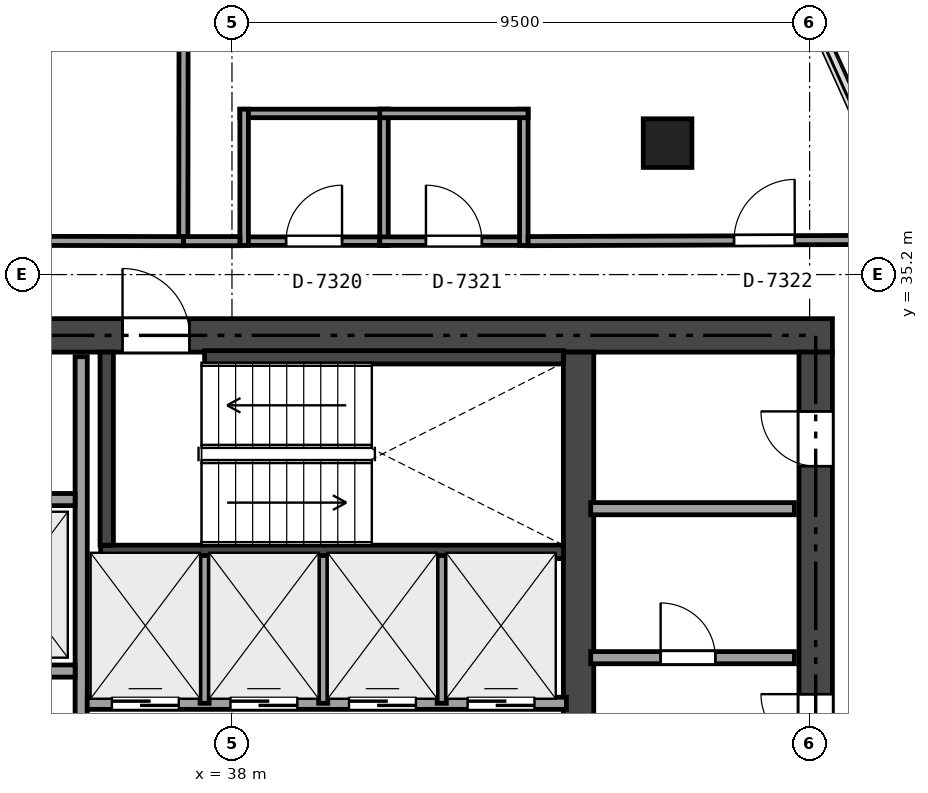
"""IFC4 building model, lengths in metres.
Left out: names, types, materials, properties, quantities, classifications, styles, units other than length and angle.
Written with IfcOpenShell. Run it as: python <this file> out.ifc"""

import sys

from ifc_helpers import new_model, si_unit, direction, frame, frame_2d, origin, origin_2d, place, context, subcontext, project, spatial, rectangle, extrude, element, fill, save


model = new_model("IFC4")
c1 = context("Model", 3, precision=1e-05, world=origin(), true_north=direction((0.0, 1.0)))
c2 = subcontext(c1, "Body", "Model", "MODEL_VIEW")
j1 = project(units=[si_unit("LENGTHUNIT", "METRE"), si_unit("PLANEANGLEUNIT", "RADIAN")], contexts=[c1])
p1 = place(None, origin())
s1 = spatial("IfcSite", under=j1, at=p1, CompositionType="ELEMENT")
p2 = place(p1, origin())
s2 = spatial("IfcBuilding", under=s1, at=p2, CompositionType="ELEMENT")
p3 = place(p2, frame((0.0, 0.0, 271.5)))
s3 = spatial("IfcBuildingStorey", under=s2, at=p3, CompositionType="ELEMENT", Elevation=271.5)
p4 = place(p3, frame((26.525, 34.2, 0.0), z_axis=(0.0, 0.0, 1.0), x_axis=(1.0, 0.0, 0.0)))
e1 = element("IfcWall", 1, at=p4, inside=s3, PredefinedType="SHEAR", context=c2, shape_type="SweptSolid", body=[
    extrude(rectangle(XDim=21.35, YDim=0.55, at=frame_2d((10.675, 0.0))), origin(), (0.0, 0.0, 1.0), 3.32),
])
p5 = place(p4, frame((9.675, 0.0, 0.0)))
e2 = element("IfcOpeningElement", 2, at=p5, cuts=e1, PredefinedType="OPENING", context=c2, shape_type="SweptSolid", body=[
    extrude(rectangle(XDim=1.1, YDim=2.15, at=frame_2d((0.55, 1.075))), frame((0.0, 0.285, 0.0), z_axis=(0.0, -1.0, 0.0), x_axis=(1.0, 0.0, 0.0)), (0.0, 0.0, 1.0), 0.57),
])
p6 = place(p4, frame((1.925, 0.0, 0.0)))
e3 = element("IfcOpeningElement", 3, at=p6, cuts=e1, PredefinedType="OPENING", context=c2, shape_type="SweptSolid", body=[
    extrude(rectangle(XDim=0.9, YDim=2.1, at=frame_2d((0.45, 1.05))), frame((0.0, 0.285, 0.0), z_axis=(0.0, -1.0, 0.0), x_axis=(1.0, 0.0, 0.0)), (0.0, 0.0, 1.0), 0.57),
])
p7 = place(p4, frame((6.225, 0.0, 0.0)))
e4 = element("IfcOpeningElement", 4, at=p7, cuts=e1, PredefinedType="OPENING", context=c2, shape_type="SweptSolid", body=[
    extrude(rectangle(XDim=0.9, YDim=2.1, at=frame_2d((0.45, 1.05))), frame((0.0, 0.285, 0.0), z_axis=(0.0, -1.0, 0.0), x_axis=(1.0, 0.0, 0.0)), (0.0, 0.0, 1.0), 0.57),
])
p8 = place(p3, frame((47.6, 18.875, 0.0), z_axis=(0.0, 0.0, 1.0), x_axis=(0.0, 1.0, 0.0)))
e5 = element("IfcWall", 5, at=p8, inside=s3, PredefinedType="SHEAR", context=c2, shape_type="SweptSolid", body=[
    extrude(rectangle(XDim=15.05, YDim=0.55, at=frame_2d((7.525, 0.0))), origin(), (0.0, 0.0, 1.0), 3.32),
])
p9 = place(p8, frame((6.625, 0.0, 0.0)))
e6 = element("IfcOpeningElement", 6, at=p9, cuts=e5, PredefinedType="OPENING", context=c2, shape_type="SweptSolid", body=[
    extrude(rectangle(XDim=1.1, YDim=2.15, at=frame_2d((0.55, 1.075))), frame((0.0, 0.285, 0.0), z_axis=(0.0, -1.0, 0.0), x_axis=(1.0, 0.0, 0.0)), (0.0, 0.0, 1.0), 0.57),
])
p10 = place(p8, frame((8.525, 0.0, 0.0)))
e7 = element("IfcOpeningElement", 7, at=p10, cuts=e5, PredefinedType="OPENING", context=c2, shape_type="SweptSolid", body=[
    extrude(rectangle(XDim=0.9, YDim=2.1, at=frame_2d((0.45, 1.05))), frame((0.0, 0.285, 0.0), z_axis=(0.0, -1.0, 0.0), x_axis=(1.0, 0.0, 0.0)), (0.0, 0.0, 1.0), 0.57),
])
p11 = place(p8, frame((13.175, 0.0, 0.0)))
e8 = element("IfcOpeningElement", 8, at=p11, cuts=e5, PredefinedType="OPENING", context=c2, shape_type="SweptSolid", body=[
    extrude(rectangle(XDim=0.9, YDim=2.1, at=frame_2d((0.45, 1.05))), frame((0.0, 0.285, 0.0), z_axis=(0.0, -1.0, 0.0), x_axis=(1.0, 0.0, 0.0)), (0.0, 0.0, 1.0), 0.57),
])
p12 = place(p3, frame((43.7, 18.875, 0.0), z_axis=(0.0, 0.0, 1.0), x_axis=(0.0, 1.0, 0.0)))
e9 = element("IfcWall", 9, at=p12, inside=s3, PredefinedType="SHEAR", context=c2, shape_type="SweptSolid", body=[
    extrude(rectangle(XDim=15.05, YDim=0.5, at=frame_2d((7.525, 0.0))), origin(), (0.0, 0.0, 1.0), 3.32),
])
p13 = place(p12, frame((8.125, 0.0, 0.0)))
e10 = element("IfcOpeningElement", 10, at=p13, cuts=e9, PredefinedType="OPENING", context=c2, shape_type="SweptSolid", body=[
    extrude(rectangle(XDim=0.9, YDim=2.1, at=frame_2d((0.45, 1.05))), frame((0.0, 0.26, 0.0), z_axis=(0.0, -1.0, 0.0), x_axis=(1.0, 0.0, 0.0)), (0.0, 0.0, 1.0), 0.52),
])
p14 = place(p3, frame((35.84, 30.64, 0.0), z_axis=(0.0, 0.0, 1.0), x_axis=(1.0, 0.0, 0.0)))
e11 = element("IfcWall", 11, at=p14, inside=s3, PredefinedType="SHEAR", context=c2, shape_type="SweptSolid", body=[
    extrude(rectangle(XDim=7.61, YDim=0.22, at=frame_2d((3.805, 0.0))), origin(), (0.0, 0.0, 1.0), 3.32),
])
p15 = place(p3, frame((35.94, 30.75, 0.0), z_axis=(0.0, 0.0, 1.0), x_axis=(0.0, 1.0, 0.0)))
e12 = element("IfcWall", 12, at=p15, inside=s3, PredefinedType="SHEAR", context=c2, shape_type="SweptSolid", body=[
    extrude(rectangle(XDim=3.175, YDim=0.22, at=frame_2d((1.587, 0.0))), origin(), (0.0, 0.0, 1.0), 3.32),
])
p16 = place(p3, frame((37.55, 33.84, 0.0), z_axis=(0.0, 0.0, 1.0), x_axis=(1.0, 0.0, 0.0)))
e13 = element("IfcWall", 13, at=p16, inside=s3, PredefinedType="SHEAR", context=c2, shape_type="SweptSolid", body=[
    extrude(rectangle(XDim=5.9, YDim=0.22, at=frame_2d((2.95, 0.0))), origin(), (0.0, 0.0, 1.0), 3.32),
])
p17 = place(p3, frame((45.164, 37.362, 0.0), z_axis=(0.0, 0.0, 1.0), x_axis=(1.0, 0.0, 0.0)))
e14 = element("IfcColumn", 14, at=p17, inside=s3, PredefinedType="COLUMN", context=c2, shape_type="SweptSolid", body=[
    extrude(rectangle(XDim=0.8, YDim=0.8, at=origin_2d()), origin(), (0.0, 0.0, 1.0), 3.32),
])
p18 = place(p3, frame((43.9, 28.9, 0.0), z_axis=(0.0, 0.0, 1.0), x_axis=(1.0, 0.0, 0.0)))
e15 = element("IfcWall", 15, at=p18, inside=s3, PredefinedType="SOLIDWALL", context=c2, shape_type="SweptSolid", body=[
    extrude(rectangle(XDim=3.35, YDim=0.2, at=frame_2d((1.675, 0.0))), origin(), (0.0, 0.0, 1.0), 3.32),
])
p19 = place(p18, frame((1.15, 0.0, 0.0)))
e16 = element("IfcOpeningElement", 16, at=p19, cuts=e15, PredefinedType="OPENING", context=c2, shape_type="SweptSolid", body=[
    extrude(rectangle(XDim=0.9, YDim=2.1, at=frame_2d((0.45, 1.05))), frame((0.0, 0.11, 0.0), z_axis=(0.0, -1.0, 0.0), x_axis=(1.0, 0.0, 0.0)), (0.0, 0.0, 1.0), 0.22),
])
p20 = place(p3, frame((43.9, 31.35, 0.0), z_axis=(0.0, 0.0, 1.0), x_axis=(1.0, 0.0, 0.0)))
e17 = element("IfcWall", 17, at=p20, inside=s3, PredefinedType="SOLIDWALL", context=c2, shape_type="SweptSolid", body=[
    extrude(rectangle(XDim=3.35, YDim=0.2, at=frame_2d((1.675, 0.0))), origin(), (0.0, 0.0, 1.0), 2.993),
])
p21 = place(p3, frame((35.52, 18.95, 0.0), z_axis=(0.0, 0.0, 1.0), x_axis=(0.0, 1.0, 0.0)))
e18 = element("IfcWall", 18, at=p21, inside=s3, PredefinedType="SOLIDWALL", context=c2, shape_type="SweptSolid", body=[
    extrude(rectangle(XDim=14.9, YDim=0.2, at=frame_2d((7.45, 0.0))), origin(), (0.0, 0.0, 1.0), 2.841),
])
p22 = place(p21, frame((7.755, 0.0, 0.0)))
e19 = element("IfcOpeningElement", 19, at=p22, cuts=e18, PredefinedType="OPENING", context=c2, shape_type="SweptSolid", body=[
    extrude(rectangle(XDim=0.95, YDim=2.15, at=frame_2d((0.475, 1.075))), frame((0.0, 0.11, 0.0), z_axis=(0.0, -1.0, 0.0), x_axis=(1.0, 0.0, 0.0)), (0.0, 0.0, 1.0), 0.22),
])
p23 = place(p21, frame((0.6, 0.0, 0.0)))
e20 = element("IfcOpeningElement", 20, at=p23, cuts=e18, PredefinedType="OPENING", context=c2, shape_type="SweptSolid", body=[
    extrude(rectangle(XDim=0.9, YDim=2.1, at=frame_2d((0.45, 1.05))), frame((0.0, 0.11, 0.0), z_axis=(0.0, -1.0, 0.0), x_axis=(1.0, 0.0, 0.0)), (0.0, 0.0, 1.0), 0.22),
])
p24 = place(p3, frame((31.0, 28.68, 0.0), z_axis=(0.0, 0.0, 1.0), x_axis=(1.0, 0.0, 0.0)))
e21 = element("IfcWall", 21, at=p24, inside=s3, PredefinedType="SOLIDWALL", context=c2, shape_type="SweptSolid", body=[
    extrude(rectangle(XDim=4.42, YDim=0.2, at=frame_2d((2.21, 0.0))), origin(), (0.0, 0.0, 1.0), 3.32),
])
p25 = place(p24, frame((0.6, 0.0, 0.0)))
e22 = element("IfcOpeningElement", 22, at=p25, cuts=e21, PredefinedType="OPENING", context=c2, shape_type="SweptSolid", body=[
    extrude(rectangle(XDim=1.1, YDim=2.15, at=frame_2d((0.55, 1.075))), frame((0.0, 0.11, 0.0), z_axis=(0.0, -1.0, 0.0), x_axis=(1.0, 0.0, 0.0)), (0.0, 0.0, 1.0), 0.22),
])
p26 = place(p24, frame((2.85, 0.0, 0.0)))
e23 = element("IfcOpeningElement", 23, at=p26, cuts=e21, PredefinedType="OPENING", context=c2, shape_type="SweptSolid", body=[
    extrude(rectangle(XDim=1.1, YDim=2.15, at=frame_2d((0.55, 1.075))), frame((0.0, 0.11, 0.0), z_axis=(0.0, -1.0, 0.0), x_axis=(1.0, 0.0, 0.0)), (0.0, 0.0, 1.0), 0.22),
])
p27 = place(p3, frame((31.0, 31.5, 0.0), z_axis=(0.0, 0.0, 1.0), x_axis=(1.0, 0.0, 0.0)))
e24 = element("IfcWall", 24, at=p27, inside=s3, PredefinedType="SOLIDWALL", context=c2, shape_type="SweptSolid", body=[
    extrude(rectangle(XDim=4.42, YDim=0.2, at=frame_2d((2.21, 0.0))), origin(), (0.0, 0.0, 1.0), 3.32),
])
p28 = place(p3, frame((35.62, 28.15, 0.0), z_axis=(0.0, 0.0, 1.0), x_axis=(1.0, 0.0, 0.0)))
e25 = element("IfcWall", 25, at=p28, inside=s3, PredefinedType="SOLIDWALL", context=c2, shape_type="SweptSolid", body=[
    extrude(rectangle(XDim=7.88, YDim=0.2, at=frame_2d((3.94, 0.0))), origin(), (0.0, 0.0, 1.0), 3.32),
])
p29 = place(p28, frame((0.405, 0.0, 0.0)))
e26 = element("IfcOpeningElement", 26, at=p29, cuts=e25, PredefinedType="OPENING", context=c2, shape_type="SweptSolid", body=[
    extrude(rectangle(XDim=1.1, YDim=2.15, at=frame_2d((0.55, 1.075))), frame((0.0, 0.11, 0.0), z_axis=(0.0, -1.0, 0.0), x_axis=(1.0, 0.0, 0.0)), (0.0, 0.0, 1.0), 0.22),
])
p30 = place(p28, frame((2.355, 0.0, 0.0)))
e27 = element("IfcOpeningElement", 27, at=p30, cuts=e25, PredefinedType="OPENING", context=c2, shape_type="SweptSolid", body=[
    extrude(rectangle(XDim=1.1, YDim=2.15, at=frame_2d((0.55, 1.075))), frame((0.0, 0.11, 0.0), z_axis=(0.0, -1.0, 0.0), x_axis=(1.0, 0.0, 0.0)), (0.0, 0.0, 1.0), 0.22),
])
p31 = place(p28, frame((4.305, 0.0, 0.0)))
e28 = element("IfcOpeningElement", 28, at=p31, cuts=e25, PredefinedType="OPENING", context=c2, shape_type="SweptSolid", body=[
    extrude(rectangle(XDim=1.1, YDim=2.15, at=frame_2d((0.55, 1.075))), frame((0.0, 0.11, 0.0), z_axis=(0.0, -1.0, 0.0), x_axis=(1.0, 0.0, 0.0)), (0.0, 0.0, 1.0), 0.22),
])
p32 = place(p28, frame((6.255, 0.0, 0.0)))
e29 = element("IfcOpeningElement", 29, at=p32, cuts=e25, PredefinedType="OPENING", context=c2, shape_type="SweptSolid", body=[
    extrude(rectangle(XDim=1.1, YDim=2.15, at=frame_2d((0.55, 1.075))), frame((0.0, 0.11, 0.0), z_axis=(0.0, -1.0, 0.0), x_axis=(1.0, 0.0, 0.0)), (0.0, 0.0, 1.0), 0.22),
])
for number, where, z_axis, x_axis in (
    (30, (37.55, 28.15, 0.0), (0.0, 0.0, 1.0), (0.0, 1.0, 0.0)),
    (31, (39.5, 28.15, 0.0), (0.0, 0.0, 1.0), (0.0, 1.0, 0.0)),
    (32, (41.45, 28.15, 0.0), (0.0, 0.0, 1.0), (0.0, 1.0, 0.0)),
):
    element("IfcWall", number, at=place(p3, frame(where, z_axis=z_axis, x_axis=x_axis)), inside=s3, PredefinedType="PARTITIONING", context=c2, shape_type="SweptSolid", body=[
        extrude(rectangle(XDim=2.43, YDim=0.15, at=frame_2d((1.215, 0.0))), origin(), (0.0, 0.0, 1.0), 3.32),
    ])
p33 = place(p3, frame((38.13, 35.75, 0.0), z_axis=(0.0, 0.0, 1.0), x_axis=(1.0, 0.0, 0.0)))
e33 = element("IfcWall", 33, at=p33, inside=s3, PredefinedType="PARTITIONING", context=c2, shape_type="SweptSolid", body=[
    extrude(rectangle(XDim=2.44, YDim=0.14, at=frame_2d((1.22, 0.0))), origin(), (0.0, 0.0, 1.0), 2.841),
])
p34 = place(p33, frame((0.76, 0.0, 0.0)))
e34 = element("IfcOpeningElement", 34, at=p34, cuts=e33, PredefinedType="OPENING", context=c2, shape_type="SweptSolid", body=[
    extrude(rectangle(XDim=0.92, YDim=2.1, at=frame_2d((0.46, 1.05))), frame((0.0, 0.08, 0.0), z_axis=(0.0, -1.0, 0.0), x_axis=(1.0, 0.0, 0.0)), (0.0, 0.0, 1.0), 0.16),
])
p35 = place(p3, frame((40.5, 35.68, 0.0), z_axis=(0.0, 0.0, 1.0), x_axis=(0.0, 1.0, 0.0)))
e35 = element("IfcWall", 35, at=p35, inside=s3, PredefinedType="PARTITIONING", context=c2, shape_type="SweptSolid", body=[
    extrude(rectangle(XDim=2.24, YDim=0.14, at=frame_2d((1.12, 0.0))), origin(), (0.0, 0.0, 1.0), 2.993),
])
p36 = place(p3, frame((40.57, 37.85, 0.0), z_axis=(0.0, 0.0, 1.0), x_axis=(-1.0, 0.0, 0.0)))
e36 = element("IfcWall", 36, at=p36, inside=s3, PredefinedType="PARTITIONING", context=c2, shape_type="SweptSolid", body=[
    extrude(rectangle(XDim=2.44, YDim=0.14, at=frame_2d((1.22, 0.0))), origin(), (0.0, 0.0, 1.0), 2.841),
])
p37 = place(p3, frame((38.2, 37.92, 0.0), z_axis=(0.0, 0.0, 1.0), x_axis=(0.0, -1.0, 0.0)))
e37 = element("IfcWall", 37, at=p37, inside=s3, PredefinedType="PARTITIONING", context=c2, shape_type="SweptSolid", body=[
    extrude(rectangle(XDim=2.24, YDim=0.14, at=frame_2d((1.12, 0.0))), origin(), (0.0, 0.0, 1.0), 2.993),
])
p38 = place(p3, frame((40.43, 35.75, 0.0), z_axis=(0.0, 0.0, 1.0), x_axis=(1.0, 0.0, 0.0)))
e38 = element("IfcWall", 38, at=p38, inside=s3, PredefinedType="PARTITIONING", context=c2, shape_type="SweptSolid", body=[
    extrude(rectangle(XDim=2.44, YDim=0.14, at=frame_2d((1.22, 0.0))), origin(), (0.0, 0.0, 1.0), 2.841),
])
p39 = place(p38, frame((0.76, 0.0, 0.0)))
e39 = element("IfcOpeningElement", 39, at=p39, cuts=e38, PredefinedType="OPENING", context=c2, shape_type="SweptSolid", body=[
    extrude(rectangle(XDim=0.92, YDim=2.1, at=frame_2d((0.46, 1.05))), frame((0.0, 0.08, 0.0), z_axis=(0.0, -1.0, 0.0), x_axis=(1.0, 0.0, 0.0)), (0.0, 0.0, 1.0), 0.16),
])
p40 = place(p3, frame((42.8, 35.68, 0.0), z_axis=(0.0, 0.0, 1.0), x_axis=(0.0, 1.0, 0.0)))
e40 = element("IfcWall", 40, at=p40, inside=s3, PredefinedType="PARTITIONING", context=c2, shape_type="SweptSolid", body=[
    extrude(rectangle(XDim=2.24, YDim=0.14, at=frame_2d((1.12, 0.0))), origin(), (0.0, 0.0, 1.0), 2.993),
])
p41 = place(p3, frame((42.87, 37.85, 0.0), z_axis=(0.0, 0.0, 1.0), x_axis=(-1.0, 0.0, 0.0)))
e41 = element("IfcWall", 41, at=p41, inside=s3, PredefinedType="PARTITIONING", context=c2, shape_type="SweptSolid", body=[
    extrude(rectangle(XDim=2.44, YDim=0.14, at=frame_2d((1.22, 0.0))), origin(), (0.0, 0.0, 1.0), 2.841),
])
p42 = place(p3, frame((37.212, 46.548, 0.0), z_axis=(0.0, 0.0, 1.0), x_axis=(-0.001107869722, -0.999999386312, 0.0)))
e42 = element("IfcWall", 42, at=p42, inside=s3, PredefinedType="PARTITIONING", context=c2, shape_type="SweptSolid", body=[
    extrude(rectangle(XDim=10.798, YDim=0.15, at=frame_2d((5.399, 0.0))), origin(), (0.0, 0.0, 1.0), 2.845),
])
p43 = place(p3, frame((37.2, 35.75, 0.0), z_axis=(0.0, 0.0, 1.0), x_axis=(1.0, 0.0, 0.0)))
e43 = element("IfcWall", 43, at=p43, inside=s3, PredefinedType="PARTITIONING", context=c2, shape_type="SweptSolid", body=[
    extrude(rectangle(XDim=0.93, YDim=0.15, at=frame_2d((0.465, 0.0))), origin(), (0.0, 0.0, 1.0), 3.32),
])
p44 = place(p3, frame((42.87, 35.75, 0.0), z_axis=(0.0, 0.0, 1.0), x_axis=(0.999994060213, 0.003446670704, 0.0)))
e44 = element("IfcWall", 44, at=p44, inside=s3, PredefinedType="PARTITIONING", context=c2, shape_type="SweptSolid", body=[
    extrude(rectangle(XDim=6.375, YDim=0.15, at=frame_2d((3.188, 0.0))), origin(), (0.0, 0.0, 1.0), 2.769),
])
p45 = place(p44, frame((3.387, 0.0, 0.0)))
e45 = element("IfcOpeningElement", 45, at=p45, cuts=e44, PredefinedType="OPENING", context=c2, shape_type="SweptSolid", body=[
    extrude(rectangle(XDim=1.0, YDim=2.15, at=frame_2d((0.5, 1.075))), frame((0.0, 0.085, 0.0), z_axis=(0.0, -1.0, 0.0), x_axis=(1.0, 0.0, 0.0)), (0.0, 0.0, 1.0), 0.17),
])
p46 = place(p3, frame((25.674, 35.77, 0.0), z_axis=(0.0, 0.0, 1.0), x_axis=(0.999998491558, -0.001736917524, 0.0)))
e46 = element("IfcWall", 46, at=p46, inside=s3, PredefinedType="PARTITIONING", context=c2, shape_type="SweptSolid", body=[
    extrude(rectangle(XDim=11.526, YDim=0.15, at=frame_2d((5.763, 0.0))), origin(), (0.0, 0.0, 1.0), 2.769),
])
p47 = place(p46, frame((5.263, 0.0, 0.0)))
e47 = element("IfcOpeningElement", 47, at=p47, cuts=e46, PredefinedType="OPENING", context=c2, shape_type="SweptSolid", body=[
    extrude(rectangle(XDim=1.0, YDim=2.15, at=frame_2d((0.5, 1.075))), frame((0.0, 0.085, 0.0), z_axis=(0.0, -1.0, 0.0), x_axis=(1.0, 0.0, 0.0)), (0.0, 0.0, 1.0), 0.17),
])
p48 = place(p5, origin())
e48 = element("IfcDoor", 48, at=p48, inside=s3, OperationType="SINGLE_SWING_LEFT", PredefinedType="DOOR", context=c2, shape_type="SweptSolid", body=[
    extrude(rectangle(XDim=1.1, YDim=2.15, at=frame_2d((0.55, 1.075))), frame((0.0, 0.025, 0.0), z_axis=(0.0, -1.0, 0.0), x_axis=(1.0, 0.0, 0.0)), (0.0, 0.0, 1.0), 0.05),
])
fill(e2, e48)
p49 = place(p10, origin())
e49 = element("IfcDoor", 49, at=p49, inside=s3, OperationType="SINGLE_SWING_RIGHT", PredefinedType="DOOR", context=c2, shape_type="SweptSolid", body=[
    extrude(rectangle(XDim=0.9, YDim=2.1, at=frame_2d((0.45, 1.05))), frame((0.0, 0.025, 0.0), z_axis=(0.0, -1.0, 0.0), x_axis=(1.0, 0.0, 0.0)), (0.0, 0.0, 1.0), 0.05),
])
fill(e7, e49)
p50 = place(p19, origin())
e50 = element("IfcDoor", 50, at=p50, inside=s3, OperationType="SINGLE_SWING_LEFT", PredefinedType="DOOR", context=c2, shape_type="SweptSolid", body=[
    extrude(rectangle(XDim=0.9, YDim=2.1, at=frame_2d((0.45, 1.05))), frame((0.0, 0.025, 0.0), z_axis=(0.0, -1.0, 0.0), x_axis=(1.0, 0.0, 0.0)), (0.0, 0.0, 1.0), 0.05),
])
fill(e16, e50)
p51 = place(p11, origin())
e51 = element("IfcDoor", 51, at=p51, inside=s3, OperationType="SINGLE_SWING_RIGHT", PredefinedType="DOOR", context=c2, shape_type="SweptSolid", body=[
    extrude(rectangle(XDim=0.9, YDim=2.1, at=frame_2d((0.45, 1.05))), frame((0.0, 0.025, 0.0), z_axis=(0.0, -1.0, 0.0), x_axis=(1.0, 0.0, 0.0)), (0.0, 0.0, 1.0), 0.05),
])
fill(e8, e51)
p52 = place(p29, origin())
e52 = element("IfcDoor", 52, at=p52, inside=s3, OperationType="SLIDING_TO_LEFT", PredefinedType="DOOR", context=c2, shape_type="SweptSolid", body=[
    extrude(rectangle(XDim=1.1, YDim=2.15, at=frame_2d((0.55, 1.075))), frame((0.0, 0.025, 0.0), z_axis=(0.0, -1.0, 0.0), x_axis=(1.0, 0.0, 0.0)), (0.0, 0.0, 1.0), 0.05),
])
fill(e26, e52)
p53 = place(p30, origin())
e53 = element("IfcDoor", 53, at=p53, inside=s3, OperationType="SLIDING_TO_LEFT", PredefinedType="DOOR", context=c2, shape_type="SweptSolid", body=[
    extrude(rectangle(XDim=1.1, YDim=2.15, at=frame_2d((0.55, 1.075))), frame((0.0, 0.025, 0.0), z_axis=(0.0, -1.0, 0.0), x_axis=(1.0, 0.0, 0.0)), (0.0, 0.0, 1.0), 0.05),
])
fill(e27, e53)
p54 = place(p31, origin())
e54 = element("IfcDoor", 54, at=p54, inside=s3, OperationType="SLIDING_TO_LEFT", PredefinedType="DOOR", context=c2, shape_type="SweptSolid", body=[
    extrude(rectangle(XDim=1.1, YDim=2.15, at=frame_2d((0.55, 1.075))), frame((0.0, 0.025, 0.0), z_axis=(0.0, -1.0, 0.0), x_axis=(1.0, 0.0, 0.0)), (0.0, 0.0, 1.0), 0.05),
])
fill(e28, e54)
p55 = place(p32, origin())
e55 = element("IfcDoor", 55, at=p55, inside=s3, OperationType="SLIDING_TO_LEFT", PredefinedType="DOOR", context=c2, shape_type="SweptSolid", body=[
    extrude(rectangle(XDim=1.1, YDim=2.15, at=frame_2d((0.55, 1.075))), frame((0.0, 0.025, 0.0), z_axis=(0.0, -1.0, 0.0), x_axis=(1.0, 0.0, 0.0)), (0.0, 0.0, 1.0), 0.05),
])
fill(e29, e55)
p56 = place(p34, origin())
e56 = element("IfcDoor", 56, at=p56, inside=s3, OperationType="SINGLE_SWING_RIGHT", PredefinedType="DOOR", context=c2, shape_type="SweptSolid", body=[
    extrude(rectangle(XDim=0.92, YDim=2.1, at=frame_2d((0.46, 1.05))), frame((0.0, 0.025, 0.0), z_axis=(0.0, -1.0, 0.0), x_axis=(1.0, 0.0, 0.0)), (0.0, 0.0, 1.0), 0.05),
])
fill(e34, e56)
p57 = place(p39, origin())
e57 = element("IfcDoor", 57, at=p57, inside=s3, OperationType="SINGLE_SWING_LEFT", PredefinedType="DOOR", context=c2, shape_type="SweptSolid", body=[
    extrude(rectangle(XDim=0.92, YDim=2.1, at=frame_2d((0.46, 1.05))), frame((0.0, 0.025, 0.0), z_axis=(0.0, -1.0, 0.0), x_axis=(1.0, 0.0, 0.0)), (0.0, 0.0, 1.0), 0.05),
])
fill(e39, e57)
p58 = place(p45, origin())
e58 = element("IfcDoor", 58, at=p58, inside=s3, OperationType="SINGLE_SWING_RIGHT", PredefinedType="DOOR", context=c2, shape_type="SweptSolid", body=[
    extrude(rectangle(XDim=1.0, YDim=2.15, at=frame_2d((0.5, 1.075))), frame((0.0, 0.025, 0.0), z_axis=(0.0, -1.0, 0.0), x_axis=(1.0, 0.0, 0.0)), (0.0, 0.0, 1.0), 0.05),
])
fill(e45, e58)
save(model, sys.argv[1])
